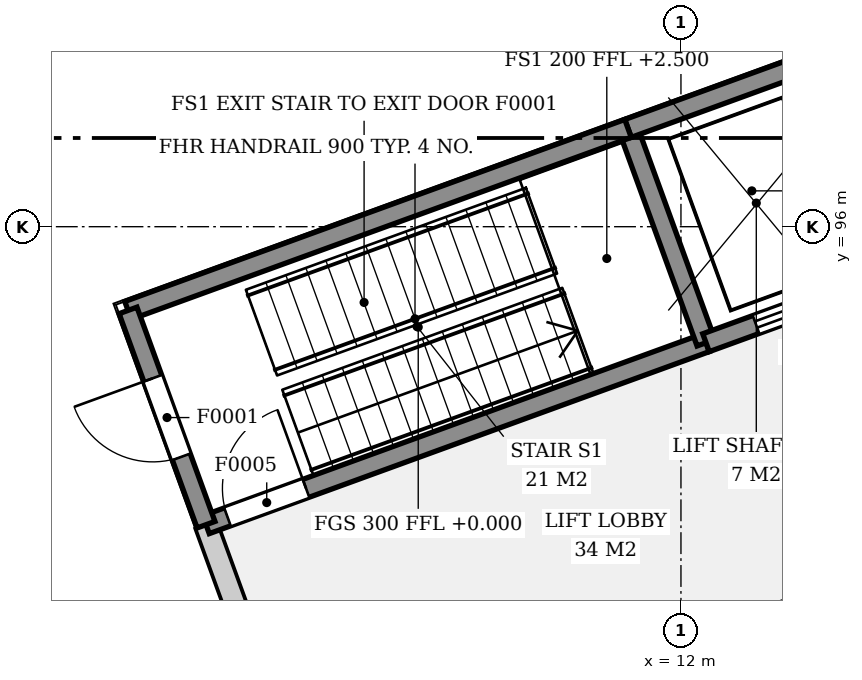
"""IFC4 building model, lengths in metres.
Left out: names, types, materials, properties, quantities, classifications, styles, units other than length and angle.
Written with IfcOpenShell. Run it as: python <this file> out.ifc"""

import sys

from ifc_helpers import new_model, si_unit, direction, frame, frame_2d, origin, place, context, subcontext, project, spatial, rectangle, extrude, element, fill, save


model = new_model("IFC4")
c1 = context("Model", 3, precision=1e-05, world=origin(), true_north=direction((0.0, 1.0)))
c2 = subcontext(c1, "Body", "Model", "MODEL_VIEW")
j1 = project(units=[si_unit("LENGTHUNIT", "METRE"), si_unit("PLANEANGLEUNIT", "RADIAN")], contexts=[c1])
p1 = place(None, origin())
s1 = spatial("IfcSite", under=j1, at=p1, CompositionType="ELEMENT")
p2 = place(p1, origin())
s2 = spatial("IfcBuilding", under=s1, at=p2, CompositionType="ELEMENT")
p3 = place(p2, origin())
s3 = spatial("IfcBuildingStorey", under=s2, at=p3, CompositionType="ELEMENT", Elevation=0.0)
p4 = place(p3, frame((5.752, 92.08, -1.2), z_axis=(0.0, 0.0, 1.0), x_axis=(0.939697665127, 0.342006283793, 0.0)))
e1 = element("IfcWall", 1, at=p4, inside=s3, PredefinedType="SOLIDWALL", context=c2, shape_type="SweptSolid", body=[
    extrude(rectangle(XDim=7.0, YDim=0.25, at=frame_2d((3.5, 0.0))), origin(), (0.0, 0.0, 1.0), 5.92),
])
p5 = place(p4, frame((0.3, 0.0, 1.2)))
e2 = element("IfcOpeningElement", 2, at=p5, cuts=e1, PredefinedType="OPENING", context=c2, shape_type="SweptSolid", body=[
    extrude(rectangle(XDim=1.1, YDim=2.1, at=frame_2d((0.55, 1.05))), frame((0.0, 0.135, 0.0), z_axis=(0.0, -1.0, 0.0), x_axis=(1.0, 0.0, 0.0)), (0.0, 0.0, 1.0), 0.27),
])
p6 = place(p3, frame((12.33, 94.474, -1.2), z_axis=(0.0, 0.0, 1.0), x_axis=(-0.342037080957, 0.939686455819, 0.0)))
e3 = element("IfcWall", 3, at=p6, inside=s3, PredefinedType="SOLIDWALL", context=c2, shape_type="SweptSolid", body=[
    extrude(rectangle(XDim=3.0, YDim=0.25, at=frame_2d((1.5, 0.0))), origin(), (0.0, 0.0, 1.0), 5.92),
])
p7 = place(p3, frame((12.33, 94.474, -1.2), z_axis=(0.0, 0.0, 1.0), x_axis=(0.939696437289, 0.342009657388, 0.0)))
e4 = element("IfcWall", 4, at=p7, inside=s3, PredefinedType="SOLIDWALL", context=c2, shape_type="SweptSolid", body=[
    extrude(rectangle(XDim=2.5, YDim=0.25, at=frame_2d((1.25, 0.0))), origin(), (0.0, 0.0, 1.0), 5.92),
])
p8 = place(p7, frame((0.7, 0.0, 1.2)))
e5 = element("IfcOpeningElement", 5, at=p8, cuts=e4, PredefinedType="OPENING", context=c2, shape_type="SweptSolid", body=[
    extrude(rectangle(XDim=1.1, YDim=2.1, at=frame_2d((0.55, 1.05))), frame((0.0, 0.135, 0.0), z_axis=(0.0, -1.0, 0.0), x_axis=(1.0, 0.0, 0.0)), (0.0, 0.0, 1.0), 0.27),
])
p9 = place(p3, frame((13.653, 98.148, -1.2), z_axis=(0.0, 0.0, 1.0), x_axis=(-0.939696437289, -0.342009657388, 0.0)))
e6 = element("IfcWall", 6, at=p9, inside=s3, PredefinedType="SOLIDWALL", context=c2, shape_type="SweptSolid", body=[
    extrude(rectangle(XDim=2.5, YDim=0.25, at=frame_2d((1.25, 0.0))), origin(), (0.0, 0.0, 1.0), 5.92),
])
p10 = place(p3, frame((11.303, 97.293, -1.2), z_axis=(0.0, 0.0, 1.0), x_axis=(-0.939686455819, -0.342037080957, 0.0)))
e7 = element("IfcWall", 7, at=p10, inside=s3, PredefinedType="SOLIDWALL", context=c2, shape_type="SweptSolid", body=[
    extrude(rectangle(XDim=7.0, YDim=0.25, at=frame_2d((3.5, 0.0))), origin(), (0.0, 0.0, 1.0), 5.92),
])
p11 = place(p3, frame((4.726, 94.898, -1.2), z_axis=(0.0, 0.0, 1.0), x_axis=(0.342063238742, -0.939676934218, 0.0)))
e8 = element("IfcWall", 8, at=p11, inside=s3, PredefinedType="SOLIDWALL", context=c2, shape_type="SweptSolid", body=[
    extrude(rectangle(XDim=3.0, YDim=0.25, at=frame_2d((1.5, 0.0))), origin(), (0.0, 0.0, 1.0), 5.92),
])
p12 = place(p11, frame((2.05, 0.0, 1.2), z_axis=(0.0, 0.0, 1.0), x_axis=(-1.0, 0.0, 0.0)))
e9 = element("IfcOpeningElement", 9, at=p12, cuts=e8, PredefinedType="OPENING", context=c2, shape_type="SweptSolid", body=[
    extrude(rectangle(XDim=1.1, YDim=2.1, at=frame_2d((0.55, 1.05))), frame((0.0, 0.135, 0.0), z_axis=(0.0, -1.0, 0.0), x_axis=(1.0, 0.0, 0.0)), (0.0, 0.0, 1.0), 0.27),
])
p13 = place(p3, frame((5.752, 92.08, 0.0), z_axis=(0.0, 0.0, 1.0), x_axis=(0.341988074343, -0.939704292321, 0.0)))
e10 = element("IfcWall", 10, at=p13, inside=s3, PredefinedType="ELEMENTEDWALL", context=c2, shape_type="SweptSolid", body=[
    extrude(rectangle(XDim=3.6, YDim=0.3, at=frame_2d((1.8, 0.0))), origin(), (0.0, 0.0, 1.0), 4.303),
])
p14 = place(p3, frame((6.983, 88.697, 0.0), z_axis=(0.0, 0.0, 1.0), x_axis=(0.939692088769, 0.342021605027, 0.0)))
e11 = element("IfcWall", 11, at=p14, inside=s3, PredefinedType="PARTITIONING", context=c2, shape_type="SweptSolid", body=[
    extrude(rectangle(XDim=9.5, YDim=0.125, at=frame_2d((4.75, 0.0))), origin(), (0.0, 0.0, 1.0), 4.187),
])
p15 = place(p12, origin())
e12 = element("IfcDoor", 12, at=p15, inside=s3, OperationType="SINGLE_SWING_LEFT", PredefinedType="DOOR", context=c2, shape_type="SweptSolid", body=[
    extrude(rectangle(XDim=1.1, YDim=2.1, at=frame_2d((0.55, 1.05))), frame((0.0, 0.025, 0.0), z_axis=(0.0, -1.0, 0.0), x_axis=(1.0, 0.0, 0.0)), (0.0, 0.0, 1.0), 0.05),
])
fill(e9, e12)
p16 = place(p8, origin())
e13 = element("IfcDoor", 13, at=p16, inside=s3, OperationType="DOUBLE_DOOR_SLIDING", PredefinedType="DOOR", context=c2, shape_type="SweptSolid", body=[
    extrude(rectangle(XDim=1.1, YDim=2.1, at=frame_2d((0.55, 1.05))), frame((0.0, 0.025, 0.0), z_axis=(0.0, -1.0, 0.0), x_axis=(1.0, 0.0, 0.0)), (0.0, 0.0, 1.0), 0.05),
])
fill(e5, e13)
p17 = place(p5, origin())
e14 = element("IfcDoor", 14, at=p17, inside=s3, OperationType="SINGLE_SWING_RIGHT", PredefinedType="DOOR", context=c2, shape_type="SweptSolid", body=[
    extrude(rectangle(XDim=1.1, YDim=2.1, at=frame_2d((0.55, 1.05))), frame((0.0, 0.025, 0.0), z_axis=(0.0, -1.0, 0.0), x_axis=(1.0, 0.0, 0.0)), (0.0, 0.0, 1.0), 0.05),
])
fill(e2, e14)
save(model, sys.argv[1])
